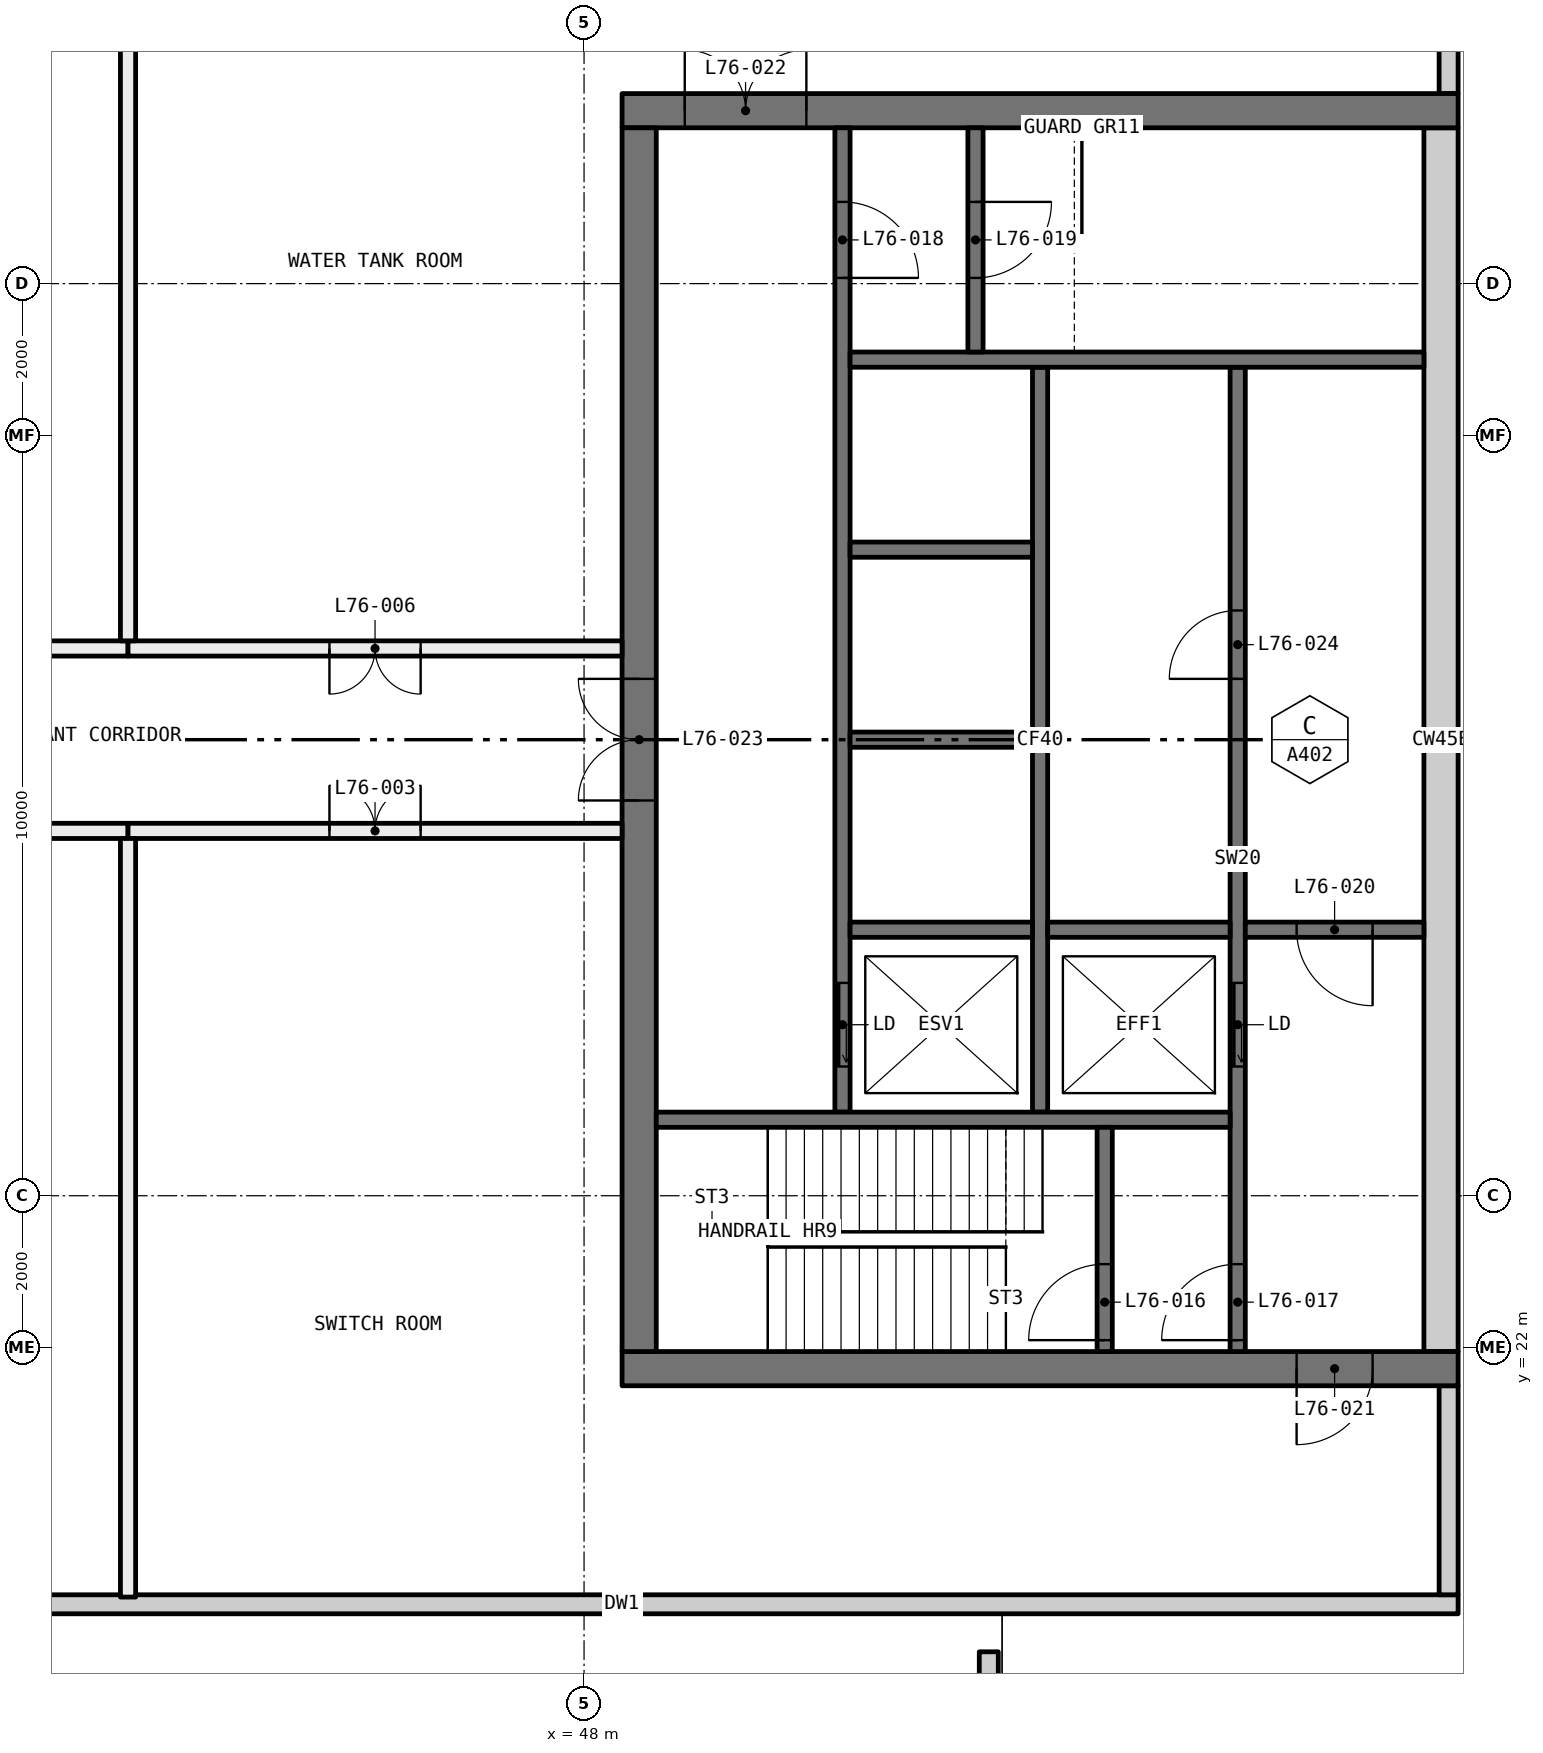
"""IFC4 building model, lengths in metres.
Left out: names, types, materials, properties, quantities, classifications, styles, units other than length and angle.
Written with IfcOpenShell. Run it as: python <this file> out.ifc"""

import sys

from ifc_helpers import new_model, si_unit, direction, frame, frame_2d, origin, place, context, subcontext, project, spatial, rectangle, extrude, element, fill, save


model = new_model("IFC4")
c1 = context("Model", 3, precision=1e-05, world=origin(), true_north=direction((0.0, 1.0)))
c2 = subcontext(c1, "Body", "Model", "MODEL_VIEW")
j1 = project(units=[si_unit("LENGTHUNIT", "METRE"), si_unit("PLANEANGLEUNIT", "RADIAN")], contexts=[c1])
p1 = place(None, origin())
s1 = spatial("IfcSite", under=j1, at=p1, CompositionType="ELEMENT")
p2 = place(p1, origin())
s2 = spatial("IfcBuilding", under=s1, at=p2, CompositionType="ELEMENT")
p3 = place(p2, frame((0.0, 0.0, 283.35)))
s3 = spatial("IfcBuildingStorey", under=s2, at=p3, CompositionType="ELEMENT", Elevation=283.35)
p4 = place(p3, frame((53.325, 18.0, 0.0), z_axis=(0.0, 0.0, 1.0), x_axis=(0.0, -1.0, 0.0)))
e1 = element("IfcWall", 1, at=p4, inside=s3, PredefinedType="PARAPET", context=c2, shape_type="SweptSolid", body=[
    extrude(rectangle(XDim=5.2, YDim=0.25, at=frame_2d((2.6, 0.0))), origin(), (0.0, 0.0, 1.0), 1.1),
])
p5 = place(p3, frame((30.0, 28.8, 0.0), z_axis=(0.0, 0.0, 1.0), x_axis=(1.0, 0.0, 0.0)))
e2 = element("IfcWall", 2, at=p5, inside=s3, PredefinedType="PARTITIONING", context=c2, shape_type="SweptSolid", body=[
    extrude(rectangle(XDim=12.0, YDim=0.2, at=frame_2d((6.0, 0.0))), origin(), (0.0, 0.0, 1.0), 3.6),
])
p6 = place(p5, frame((5.4, 0.0, 0.0)))
e3 = element("IfcOpeningElement", 3, at=p6, cuts=e2, PredefinedType="OPENING", context=c2, shape_type="SweptSolid", body=[
    extrude(rectangle(XDim=1.2, YDim=2.1, at=frame_2d((0.6, 1.05))), frame((0.0, 0.11, 0.0), z_axis=(0.0, -1.0, 0.0), x_axis=(1.0, 0.0, 0.0)), (0.0, 0.0, 1.0), 0.22),
])
p7 = place(p3, frame((42.0, 28.8, 0.0), z_axis=(0.0, 0.0, 1.0), x_axis=(1.0, 0.0, 0.0)))
e4 = element("IfcWall", 4, at=p7, inside=s3, PredefinedType="PARTITIONING", context=c2, shape_type="SweptSolid", body=[
    extrude(rectangle(XDim=6.5, YDim=0.2, at=frame_2d((3.25, 0.0))), origin(), (0.0, 0.0, 1.0), 3.6),
])
p8 = place(p7, frame((2.65, 0.0, 0.0)))
e5 = element("IfcOpeningElement", 5, at=p8, cuts=e4, PredefinedType="OPENING", context=c2, shape_type="SweptSolid", body=[
    extrude(rectangle(XDim=1.2, YDim=2.1, at=frame_2d((0.6, 1.05))), frame((0.0, 0.11, 0.0), z_axis=(0.0, -1.0, 0.0), x_axis=(1.0, 0.0, 0.0)), (0.0, 0.0, 1.0), 0.22),
])
p9 = place(p3, frame((42.0, 31.2, 0.0), z_axis=(0.0, 0.0, 1.0), x_axis=(-1.0, 0.0, 0.0)))
e6 = element("IfcWall", 6, at=p9, inside=s3, PredefinedType="PARTITIONING", context=c2, shape_type="SweptSolid", body=[
    extrude(rectangle(XDim=12.0, YDim=0.2, at=frame_2d((6.0, 0.0))), origin(), (0.0, 0.0, 1.0), 3.6),
])
p10 = place(p9, frame((5.4, 0.0, 0.0)))
e7 = element("IfcOpeningElement", 7, at=p10, cuts=e6, PredefinedType="OPENING", context=c2, shape_type="SweptSolid", body=[
    extrude(rectangle(XDim=1.2, YDim=2.1, at=frame_2d((0.6, 1.05))), frame((0.0, 0.11, 0.0), z_axis=(0.0, -1.0, 0.0), x_axis=(1.0, 0.0, 0.0)), (0.0, 0.0, 1.0), 0.22),
])
p11 = place(p3, frame((48.5, 31.2, 0.0), z_axis=(0.0, 0.0, 1.0), x_axis=(-1.0, 0.0, 0.0)))
e8 = element("IfcWall", 8, at=p11, inside=s3, PredefinedType="PARTITIONING", context=c2, shape_type="SweptSolid", body=[
    extrude(rectangle(XDim=6.5, YDim=0.2, at=frame_2d((3.25, 0.0))), origin(), (0.0, 0.0, 1.0), 3.6),
])
p12 = place(p11, frame((2.65, 0.0, 0.0)))
e9 = element("IfcOpeningElement", 9, at=p12, cuts=e8, PredefinedType="OPENING", context=c2, shape_type="SweptSolid", body=[
    extrude(rectangle(XDim=1.2, YDim=2.1, at=frame_2d((0.6, 1.05))), frame((0.0, 0.11, 0.0), z_axis=(0.0, -1.0, 0.0), x_axis=(1.0, 0.0, 0.0)), (0.0, 0.0, 1.0), 0.22),
])
for number, where, z_axis, x_axis in (
    (10, (42.0, 18.72, 0.0), (0.0, 0.0, 1.0), (0.0, 1.0, 0.0)),
    (11, (42.0, 31.3, 0.0), (0.0, 0.0, 1.0), (0.0, 1.0, 0.0)),
):
    element("IfcWall", number, at=place(p3, frame(where, z_axis=z_axis, x_axis=x_axis)), inside=s3, PredefinedType="PARTITIONING", context=c2, shape_type="SweptSolid", body=[
        extrude(rectangle(XDim=9.98, YDim=0.2, at=frame_2d((4.99, 0.0))), origin(), (0.0, 0.0, 1.0), 5.6),
    ])
p13 = place(p3, frame((59.5, 21.725, 0.0), z_axis=(0.0, 0.0, 1.0), x_axis=(-1.0, 0.0, 0.0)))
e12 = element("IfcWall", 12, at=p13, inside=s3, PredefinedType="SHEAR", context=c2, shape_type="SweptSolid", body=[
    extrude(rectangle(XDim=11.0, YDim=0.45, at=frame_2d((5.5, 0.0))), origin(), (0.0, 0.0, 1.0), 5.6),
])
p14 = place(p13, frame((1.125, 0.0, 0.0)))
e13 = element("IfcOpeningElement", 13, at=p14, cuts=e12, PredefinedType="OPENING", context=c2, shape_type="SweptSolid", body=[
    extrude(rectangle(XDim=1.0, YDim=2.1, at=frame_2d((0.5, 1.05))), frame((0.0, 0.235, 0.0), z_axis=(0.0, -1.0, 0.0), x_axis=(1.0, 0.0, 0.0)), (0.0, 0.0, 1.0), 0.47),
])
p15 = place(p3, frame((59.5, 38.275, 0.0), z_axis=(0.0, 0.0, 1.0), x_axis=(-1.0, 0.0, 0.0)))
e14 = element("IfcWall", 14, at=p15, inside=s3, PredefinedType="SHEAR", context=c2, shape_type="SweptSolid", body=[
    extrude(rectangle(XDim=11.0, YDim=0.45, at=frame_2d((5.5, 0.0))), origin(), (0.0, 0.0, 1.0), 5.6),
])
p16 = place(p15, frame((8.575, 0.0, 0.0)))
e15 = element("IfcOpeningElement", 15, at=p16, cuts=e14, PredefinedType="OPENING", context=c2, shape_type="SweptSolid", body=[
    extrude(rectangle(XDim=1.6, YDim=2.1, at=frame_2d((0.8, 1.05))), frame((0.0, 0.235, 0.0), z_axis=(0.0, -1.0, 0.0), x_axis=(1.0, 0.0, 0.0)), (0.0, 0.0, 1.0), 0.47),
])
p17 = place(p3, frame((59.275, 21.95, 0.0), z_axis=(0.0, 0.0, 1.0), x_axis=(0.0, 1.0, 0.0)))
e16 = element("IfcWall", 16, at=p17, inside=s3, PredefinedType="SHEAR", context=c2, shape_type="SweptSolid", body=[
    extrude(rectangle(XDim=16.1, YDim=0.45, at=frame_2d((8.05, 0.0))), origin(), (0.0, 0.0, 1.0), 5.6),
])
p18 = place(p3, frame((48.725, 21.95, 0.0), z_axis=(0.0, 0.0, 1.0), x_axis=(0.0, 1.0, 0.0)))
e17 = element("IfcWall", 17, at=p18, inside=s3, PredefinedType="SHEAR", context=c2, shape_type="SweptSolid", body=[
    extrude(rectangle(XDim=16.1, YDim=0.45, at=frame_2d((8.05, 0.0))), origin(), (0.0, 0.0, 1.0), 5.6),
])
p19 = place(p18, frame((7.25, 0.0, 0.0)))
e18 = element("IfcOpeningElement", 18, at=p19, cuts=e17, PredefinedType="OPENING", context=c2, shape_type="SweptSolid", body=[
    extrude(rectangle(XDim=1.6, YDim=2.1, at=frame_2d((0.8, 1.05))), frame((0.0, 0.235, 0.0), z_axis=(0.0, -1.0, 0.0), x_axis=(1.0, 0.0, 0.0)), (0.0, 0.0, 1.0), 0.47),
])
p20 = place(p3, frame((56.6, 21.95, 0.0), z_axis=(0.0, 0.0, 1.0), x_axis=(0.0, 1.0, 0.0)))
e19 = element("IfcWall", 19, at=p20, inside=s3, PredefinedType="SOLIDWALL", context=c2, shape_type="SweptSolid", body=[
    extrude(rectangle(XDim=12.95, YDim=0.2, at=frame_2d((6.475, 0.0))), origin(), (0.0, 0.0, 1.0), 5.6),
])
p21 = place(p20, frame((3.75, 0.0, 0.0)))
e20 = element("IfcOpeningElement", 20, at=p21, cuts=e19, PredefinedType="OPENING", context=c2, shape_type="SweptSolid", body=[
    extrude(rectangle(XDim=1.1, YDim=2.1, at=frame_2d((0.55, 1.05))), frame((0.0, 0.11, 0.0), z_axis=(0.0, -1.0, 0.0), x_axis=(1.0, 0.0, 0.0)), (0.0, 0.0, 1.0), 0.22),
])
p22 = place(p20, frame((0.15, 0.0, 0.0)))
e21 = element("IfcOpeningElement", 21, at=p22, cuts=e19, PredefinedType="OPENING", context=c2, shape_type="SweptSolid", body=[
    extrude(rectangle(XDim=1.0, YDim=2.1, at=frame_2d((0.5, 1.05))), frame((0.0, 0.11, 0.0), z_axis=(0.0, -1.0, 0.0), x_axis=(1.0, 0.0, 0.0)), (0.0, 0.0, 1.0), 0.22),
])
p23 = place(p20, frame((8.85, 0.0, 0.0)))
e22 = element("IfcOpeningElement", 22, at=p23, cuts=e19, PredefinedType="OPENING", context=c2, shape_type="SweptSolid", body=[
    extrude(rectangle(XDim=0.9, YDim=2.1, at=frame_2d((0.45, 1.05))), frame((0.0, 0.11, 0.0), z_axis=(0.0, -1.0, 0.0), x_axis=(1.0, 0.0, 0.0)), (0.0, 0.0, 1.0), 0.22),
])
p24 = place(p3, frame((51.4, 25.1, 0.0), z_axis=(0.0, 0.0, 1.0), x_axis=(0.0, 1.0, 0.0)))
e23 = element("IfcWall", 23, at=p24, inside=s3, PredefinedType="SOLIDWALL", context=c2, shape_type="SweptSolid", body=[
    extrude(rectangle(XDim=12.95, YDim=0.2, at=frame_2d((6.475, 0.0))), origin(), (0.0, 0.0, 1.0), 5.6),
])
p25 = place(p24, frame((0.6, 0.0, 0.0)))
e24 = element("IfcOpeningElement", 24, at=p25, cuts=e23, PredefinedType="OPENING", context=c2, shape_type="SweptSolid", body=[
    extrude(rectangle(XDim=1.1, YDim=2.1, at=frame_2d((0.55, 1.05))), frame((0.0, 0.11, 0.0), z_axis=(0.0, -1.0, 0.0), x_axis=(1.0, 0.0, 0.0)), (0.0, 0.0, 1.0), 0.22),
])
p26 = place(p24, frame((10.975, 0.0, 0.0)))
e25 = element("IfcOpeningElement", 25, at=p26, cuts=e23, PredefinedType="OPENING", context=c2, shape_type="SweptSolid", body=[
    extrude(rectangle(XDim=1.0, YDim=2.1, at=frame_2d((0.5, 1.05))), frame((0.0, 0.11, 0.0), z_axis=(0.0, -1.0, 0.0), x_axis=(1.0, 0.0, 0.0)), (0.0, 0.0, 1.0), 0.22),
])
p27 = place(p3, frame((54.0, 25.1, 0.0), z_axis=(0.0, 0.0, 1.0), x_axis=(0.0, 1.0, 0.0)))
e26 = element("IfcWall", 26, at=p27, inside=s3, PredefinedType="SOLIDWALL", context=c2, shape_type="SweptSolid", body=[
    extrude(rectangle(XDim=9.8, YDim=0.2, at=frame_2d((4.9, 0.0))), origin(), (0.0, 0.0, 1.0), 5.6),
])
for number, where, z_axis, x_axis in (
    (27, (56.5, 25.0, 0.0), (0.0, 0.0, 1.0), (-1.0, 0.0, 0.0)),
    (28, (59.05, 35.0, 0.0), (0.0, 0.0, 1.0), (-1.0, 0.0, 0.0)),
):
    element("IfcWall", number, at=place(p3, frame(where, z_axis=z_axis, x_axis=x_axis)), inside=s3, PredefinedType="SOLIDWALL", context=c2, shape_type="SweptSolid", body=[
        extrude(rectangle(XDim=7.55, YDim=0.2, at=frame_2d((3.775, 0.0))), origin(), (0.0, 0.0, 1.0), 5.6),
    ])
p28 = place(p3, frame((59.05, 27.5, 0.0), z_axis=(0.0, 0.0, 1.0), x_axis=(-1.0, 0.0, 0.0)))
e29 = element("IfcWall", 29, at=p28, inside=s3, PredefinedType="SOLIDWALL", context=c2, shape_type="SweptSolid", body=[
    extrude(rectangle(XDim=2.35, YDim=0.2, at=frame_2d((1.175, 0.0))), origin(), (0.0, 0.0, 1.0), 5.6),
])
p29 = place(p28, frame((0.675, 0.0, 0.0)))
e30 = element("IfcOpeningElement", 30, at=p29, cuts=e29, PredefinedType="OPENING", context=c2, shape_type="SweptSolid", body=[
    extrude(rectangle(XDim=1.0, YDim=2.1, at=frame_2d((0.5, 1.05))), frame((0.0, 0.11, 0.0), z_axis=(0.0, -1.0, 0.0), x_axis=(1.0, 0.0, 0.0)), (0.0, 0.0, 1.0), 0.22),
])
p30 = place(p3, frame((54.85, 21.95, 0.0), z_axis=(0.0, 0.0, 1.0), x_axis=(0.0, 1.0, 0.0)))
e31 = element("IfcWall", 31, at=p30, inside=s3, PredefinedType="SOLIDWALL", context=c2, shape_type="SweptSolid", body=[
    extrude(rectangle(XDim=2.95, YDim=0.2, at=frame_2d((1.475, 0.0))), origin(), (0.0, 0.0, 1.0), 5.6),
])
p31 = place(p30, frame((0.15, 0.0, 0.0)))
e32 = element("IfcOpeningElement", 32, at=p31, cuts=e31, PredefinedType="OPENING", context=c2, shape_type="SweptSolid", body=[
    extrude(rectangle(XDim=1.0, YDim=2.1, at=frame_2d((0.5, 1.05))), frame((0.0, 0.11, 0.0), z_axis=(0.0, -1.0, 0.0), x_axis=(1.0, 0.0, 0.0)), (0.0, 0.0, 1.0), 0.22),
])
p32 = place(p3, frame((53.15, 35.1, 0.0), z_axis=(0.0, 0.0, 1.0), x_axis=(0.0, 1.0, 0.0)))
e33 = element("IfcWall", 33, at=p32, inside=s3, PredefinedType="SOLIDWALL", context=c2, shape_type="SweptSolid", body=[
    extrude(rectangle(XDim=2.95, YDim=0.2, at=frame_2d((1.475, 0.0))), origin(), (0.0, 0.0, 1.0), 5.6),
])
p33 = place(p32, frame((0.975, 0.0, 0.0)))
e34 = element("IfcOpeningElement", 34, at=p33, cuts=e33, PredefinedType="OPENING", context=c2, shape_type="SweptSolid", body=[
    extrude(rectangle(XDim=1.0, YDim=2.1, at=frame_2d((0.5, 1.05))), frame((0.0, 0.11, 0.0), z_axis=(0.0, -1.0, 0.0), x_axis=(1.0, 0.0, 0.0)), (0.0, 0.0, 1.0), 0.22),
])
for number, where, z_axis, x_axis in (
    (35, (56.5, 27.5, 0.0), (0.0, 0.0, 1.0), (-1.0, 0.0, 0.0)),
    (36, (53.9, 27.5, 0.0), (0.0, 0.0, 1.0), (-1.0, 0.0, 0.0)),
    (37, (53.9, 30.0, 0.0), (0.0, 0.0, 1.0), (-1.0, 0.0, 0.0)),
    (38, (53.9, 32.5, 0.0), (0.0, 0.0, 1.0), (-1.0, 0.0, 0.0)),
):
    element("IfcWall", number, at=place(p3, frame(where, z_axis=z_axis, x_axis=x_axis)), inside=s3, PredefinedType="SOLIDWALL", context=c2, shape_type="SweptSolid", body=[
        extrude(rectangle(XDim=2.4, YDim=0.2, at=frame_2d((1.2, 0.0))), origin(), (0.0, 0.0, 1.0), 5.6),
    ])
p34 = place(p3, frame((37.5, 18.625, 0.0), z_axis=(0.0, 0.0, 1.0), x_axis=(1.0, 0.0, 0.0)))
e39 = element("IfcWall", 39, at=p34, inside=s3, PredefinedType="SOLIDWALL", context=c2, shape_type="SweptSolid", body=[
    extrude(rectangle(XDim=22.0, YDim=0.25, at=frame_2d((11.0, 0.0))), origin(), (0.0, 0.0, 1.0), 1.2),
])
for number, where, z_axis, x_axis in (
    (40, (59.375, 18.75, 0.0), (0.0, 0.0, 1.0), (0.0, 1.0, 0.0)),
    (41, (59.375, 38.5, 0.0), (0.0, 0.0, 1.0), (0.0, 1.0, 0.0)),
):
    element("IfcWall", number, at=place(p3, frame(where, z_axis=z_axis, x_axis=x_axis)), inside=s3, PredefinedType="SOLIDWALL", context=c2, shape_type="SweptSolid", body=[
        extrude(rectangle(XDim=2.75, YDim=0.25, at=frame_2d((1.375, 0.0))), origin(), (0.0, 0.0, 1.0), 1.2),
    ])
p35 = place(p8, origin())
e42 = element("IfcDoor", 42, at=p35, inside=s3, OperationType="DOUBLE_DOOR_SINGLE_SWING", PredefinedType="DOOR", context=c2, shape_type="SweptSolid", body=[
    extrude(rectangle(XDim=1.2, YDim=2.1, at=frame_2d((0.6, 1.05))), frame((0.0, 0.025, 0.0), z_axis=(0.0, -1.0, 0.0), x_axis=(1.0, 0.0, 0.0)), (0.0, 0.0, 1.0), 0.05),
])
fill(e5, e42)
p36 = place(p12, origin())
e43 = element("IfcDoor", 43, at=p36, inside=s3, OperationType="DOUBLE_DOOR_SINGLE_SWING", PredefinedType="DOOR", context=c2, shape_type="SweptSolid", body=[
    extrude(rectangle(XDim=1.2, YDim=2.1, at=frame_2d((0.6, 1.05))), frame((0.0, 0.025, 0.0), z_axis=(0.0, -1.0, 0.0), x_axis=(1.0, 0.0, 0.0)), (0.0, 0.0, 1.0), 0.05),
])
fill(e9, e43)
p37 = place(p25, origin())
e44 = element("IfcDoor", 44, at=p37, inside=s3, OperationType="SLIDING_TO_LEFT", PredefinedType="DOOR", context=c2, shape_type="SweptSolid", body=[
    extrude(rectangle(XDim=1.1, YDim=2.1, at=frame_2d((0.55, 1.05))), frame((0.0, 0.025, 0.0), z_axis=(0.0, -1.0, 0.0), x_axis=(1.0, 0.0, 0.0)), (0.0, 0.0, 1.0), 0.05),
])
fill(e24, e44)
p38 = place(p21, origin())
e45 = element("IfcDoor", 45, at=p38, inside=s3, OperationType="SLIDING_TO_LEFT", PredefinedType="DOOR", context=c2, shape_type="SweptSolid", body=[
    extrude(rectangle(XDim=1.1, YDim=2.1, at=frame_2d((0.55, 1.05))), frame((0.0, 0.025, 0.0), z_axis=(0.0, -1.0, 0.0), x_axis=(1.0, 0.0, 0.0)), (0.0, 0.0, 1.0), 0.05),
])
fill(e20, e45)
p39 = place(p31, origin())
e46 = element("IfcDoor", 46, at=p39, inside=s3, OperationType="SINGLE_SWING_RIGHT", PredefinedType="DOOR", context=c2, shape_type="SweptSolid", body=[
    extrude(rectangle(XDim=1.0, YDim=2.1, at=frame_2d((0.5, 1.05))), frame((0.0, 0.025, 0.0), z_axis=(0.0, -1.0, 0.0), x_axis=(1.0, 0.0, 0.0)), (0.0, 0.0, 1.0), 0.05),
])
fill(e32, e46)
p40 = place(p22, origin())
e47 = element("IfcDoor", 47, at=p40, inside=s3, OperationType="SINGLE_SWING_RIGHT", PredefinedType="DOOR", context=c2, shape_type="SweptSolid", body=[
    extrude(rectangle(XDim=1.0, YDim=2.1, at=frame_2d((0.5, 1.05))), frame((0.0, 0.025, 0.0), z_axis=(0.0, -1.0, 0.0), x_axis=(1.0, 0.0, 0.0)), (0.0, 0.0, 1.0), 0.05),
])
fill(e21, e47)
p41 = place(p26, frame((1.0, 0.0, 0.0), x_axis=(-1.0, 0.0, 0.0)))
e48 = element("IfcDoor", 48, at=p41, inside=s3, OperationType="SINGLE_SWING_LEFT", PredefinedType="DOOR", context=c2, shape_type="SweptSolid", body=[
    extrude(rectangle(XDim=1.0, YDim=2.1, at=frame_2d((0.5, 1.05))), frame((0.0, 0.025, 0.0), z_axis=(0.0, -1.0, 0.0), x_axis=(1.0, 0.0, 0.0)), (0.0, 0.0, 1.0), 0.05),
])
fill(e25, e48)
p42 = place(p33, frame((1.0, 0.0, 0.0), x_axis=(-1.0, 0.0, 0.0)))
e49 = element("IfcDoor", 49, at=p42, inside=s3, OperationType="SINGLE_SWING_RIGHT", PredefinedType="DOOR", context=c2, shape_type="SweptSolid", body=[
    extrude(rectangle(XDim=1.0, YDim=2.1, at=frame_2d((0.5, 1.05))), frame((0.0, 0.025, 0.0), z_axis=(0.0, -1.0, 0.0), x_axis=(1.0, 0.0, 0.0)), (0.0, 0.0, 1.0), 0.05),
])
fill(e34, e49)
p43 = place(p29, origin())
e50 = element("IfcDoor", 50, at=p43, inside=s3, OperationType="SINGLE_SWING_RIGHT", PredefinedType="DOOR", context=c2, shape_type="SweptSolid", body=[
    extrude(rectangle(XDim=1.0, YDim=2.1, at=frame_2d((0.5, 1.05))), frame((0.0, 0.025, 0.0), z_axis=(0.0, -1.0, 0.0), x_axis=(1.0, 0.0, 0.0)), (0.0, 0.0, 1.0), 0.05),
])
fill(e30, e50)
p44 = place(p14, origin())
e51 = element("IfcDoor", 51, at=p44, inside=s3, OperationType="SINGLE_SWING_LEFT", PredefinedType="DOOR", context=c2, shape_type="SweptSolid", body=[
    extrude(rectangle(XDim=1.0, YDim=2.1, at=frame_2d((0.5, 1.05))), frame((0.0, 0.025, 0.0), z_axis=(0.0, -1.0, 0.0), x_axis=(1.0, 0.0, 0.0)), (0.0, 0.0, 1.0), 0.05),
])
fill(e13, e51)
p45 = place(p16, frame((1.6, 0.0, 0.0), x_axis=(-1.0, 0.0, 0.0)))
e52 = element("IfcDoor", 52, at=p45, inside=s3, OperationType="DOUBLE_DOOR_SINGLE_SWING", PredefinedType="DOOR", context=c2, shape_type="SweptSolid", body=[
    extrude(rectangle(XDim=1.6, YDim=2.1, at=frame_2d((0.8, 1.05))), frame((0.0, 0.025, 0.0), z_axis=(0.0, -1.0, 0.0), x_axis=(1.0, 0.0, 0.0)), (0.0, 0.0, 1.0), 0.05),
])
fill(e15, e52)
p46 = place(p19, origin())
e53 = element("IfcDoor", 53, at=p46, inside=s3, OperationType="DOUBLE_DOOR_SINGLE_SWING", PredefinedType="DOOR", context=c2, shape_type="SweptSolid", body=[
    extrude(rectangle(XDim=1.6, YDim=2.1, at=frame_2d((0.8, 1.05))), frame((0.0, 0.025, 0.0), z_axis=(0.0, -1.0, 0.0), x_axis=(1.0, 0.0, 0.0)), (0.0, 0.0, 1.0), 0.05),
])
fill(e18, e53)
p47 = place(p23, origin())
e54 = element("IfcDoor", 54, at=p47, inside=s3, OperationType="SINGLE_SWING_RIGHT", PredefinedType="DOOR", context=c2, shape_type="SweptSolid", body=[
    extrude(rectangle(XDim=0.9, YDim=2.1, at=frame_2d((0.45, 1.05))), frame((0.0, 0.025, 0.0), z_axis=(0.0, -1.0, 0.0), x_axis=(1.0, 0.0, 0.0)), (0.0, 0.0, 1.0), 0.05),
])
fill(e22, e54)
save(model, sys.argv[1])
